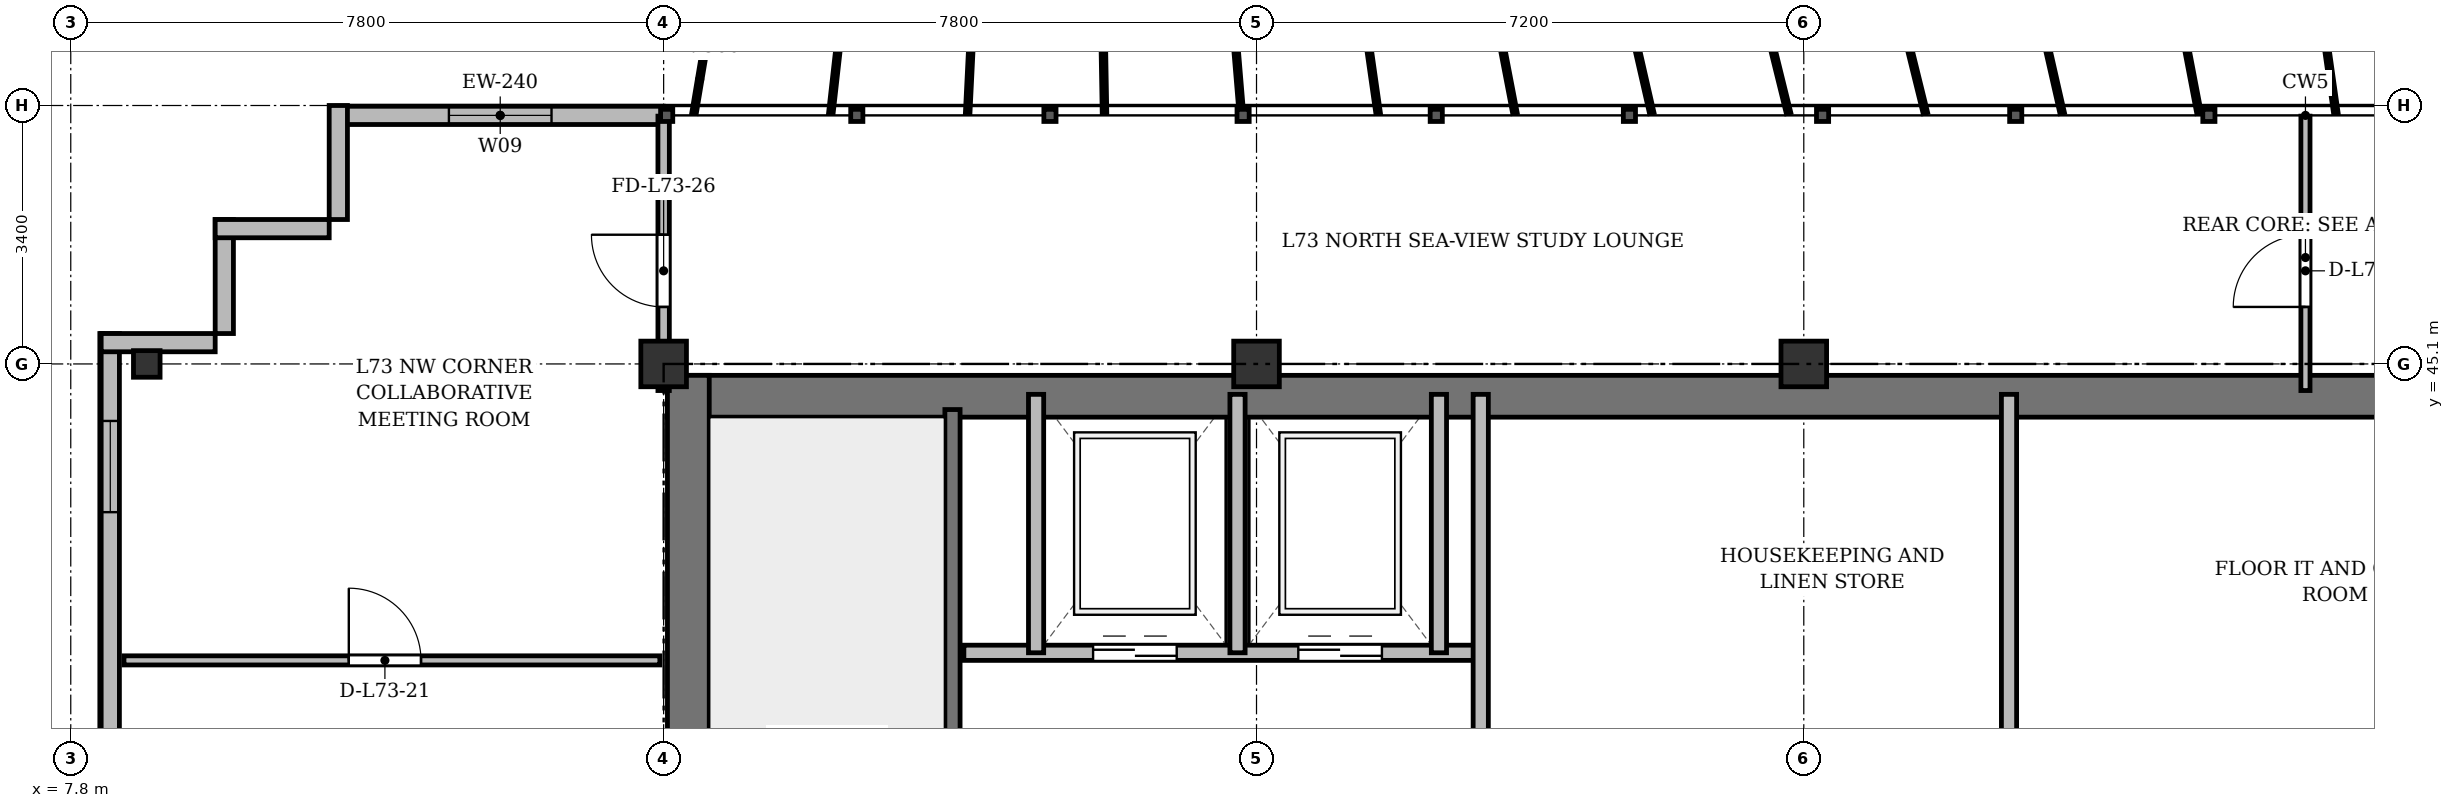
"""IFC4 building model, lengths in metres.
Left out: names, types, materials, properties, quantities, classifications, styles, units other than length and angle.
Written with IfcOpenShell. Run it as: python <this file> out.ifc"""

import sys

from ifc_helpers import new_model, si_unit, direction, frame, frame_2d, origin, origin_2d, place, context, subcontext, project, spatial, rectangle, i_section, extrude, source, transform, mapped, element, fill, save


model = new_model("IFC4")
c1 = context("Model", 3, precision=1e-05, world=origin(), true_north=direction((0.0, 1.0)))
c2 = subcontext(c1, "Body", "Model", "MODEL_VIEW")
j1 = project(units=[si_unit("LENGTHUNIT", "METRE"), si_unit("PLANEANGLEUNIT", "RADIAN")], contexts=[c1])
p1 = place(None, origin())
s1 = spatial("IfcSite", under=j1, at=p1, CompositionType="ELEMENT")
p2 = place(p1, origin())
s2 = spatial("IfcBuilding", under=s1, at=p2, CompositionType="ELEMENT")
p3 = place(p2, frame((0.0, 0.0, 281.1)))
s3 = spatial("IfcBuildingStorey", under=s2, at=p3, CompositionType="ELEMENT", Elevation=281.1)
m1 = source(origin(), c2, "Body", "SweptSolid", [
    extrude(i_section(OverallWidth=0.35, OverallDepth=0.35, WebThickness=0.018, FlangeThickness=0.028, at=origin_2d()), origin(), (0.0, 0.0, 1.0), 3.6),
])
p4 = place(p3, frame((8.8, 45.1, 0.0), z_axis=(0.0, 0.0, 1.0), x_axis=(1.0, 0.0, 0.0)))
e1 = element("IfcColumn", 1, at=p4, inside=s3, PredefinedType="COLUMN", context=c2, shape_type="MappedRepresentation", body=[
    mapped(m1, transform((0.0, 0.0, 0.0), x_axis=(1.0, 0.0, 0.0), y_axis=(0.0, 1.0, 0.0), z_axis=(0.0, 0.0, 1.0), scale=1.0)),
])
m2 = source(origin(), c2, "Body", "SweptSolid", [
    extrude(rectangle(XDim=0.6, YDim=0.6, at=origin_2d()), origin(), (0.0, 0.0, 1.0), 3.6),
])
for number, where, z_axis, x_axis in (
    (2, (15.6, 45.1, 0.0), (0.0, 0.0, 1.0), (1.0, 0.0, 0.0)),
    (3, (23.4, 45.1, 0.0), (0.0, 0.0, 1.0), (1.0, 0.0, 0.0)),
    (4, (30.6, 45.1, 0.0), (0.0, 0.0, 1.0), (1.0, 0.0, 0.0)),
):
    element("IfcColumn", number, at=place(p3, frame(where, z_axis=z_axis, x_axis=x_axis)), inside=s3, PredefinedType="COLUMN", context=c2, shape_type="MappedRepresentation", body=[
        mapped(m2, transform((0.0, 0.0, 0.0), x_axis=(1.0, 0.0, 0.0), y_axis=(0.0, 1.0, 0.0), z_axis=(0.0, 0.0, 1.0), scale=1.0)),
    ])
p5 = place(p3, frame((11.3, 48.37, 0.0), z_axis=(0.0, 0.0, 1.0), x_axis=(1.0, 0.0, 0.0)))
e5 = element("IfcWall", 5, at=p5, inside=s3, PredefinedType="SOLIDWALL", context=c2, shape_type="SweptSolid", body=[
    extrude(rectangle(XDim=4.3, YDim=0.24, at=frame_2d((2.15, 0.0))), origin(), (0.0, 0.0, 1.0), 3.37),
])
p6 = place(p5, frame((1.475, 0.0, 0.9)))
e6 = element("IfcOpeningElement", 6, at=p6, cuts=e5, PredefinedType="OPENING", context=c2, shape_type="SweptSolid", body=[
    extrude(rectangle(XDim=1.35, YDim=1.5, at=frame_2d((0.675, 0.75))), frame((0.0, 0.13, 0.0), z_axis=(0.0, -1.0, 0.0), x_axis=(1.0, 0.0, 0.0)), (0.0, 0.0, 1.0), 0.26),
])
p7 = place(p3, frame((8.32, 6.5, 0.0), z_axis=(0.0, 0.0, 1.0), x_axis=(0.0, 1.0, 0.0)))
e7 = element("IfcWall", 7, at=p7, inside=s3, PredefinedType="SOLIDWALL", context=c2, shape_type="SweptSolid", body=[
    extrude(rectangle(XDim=39.0, YDim=0.24, at=frame_2d((19.5, 0.0))), origin(), (0.0, 0.0, 1.0), 3.37),
])
p8 = place(p7, frame((1.45, 0.0, 0.92)))
e8 = element("IfcOpeningElement", 8, at=p8, cuts=e7, PredefinedType="OPENING", context=c2, shape_type="SweptSolid", body=[
    extrude(rectangle(XDim=1.2, YDim=1.65, at=frame_2d((0.6, 0.825))), frame((0.0, 0.13, 0.0), z_axis=(0.0, -1.0, 0.0), x_axis=(1.0, 0.0, 0.0)), (0.0, 0.0, 1.0), 0.26),
])
p9 = place(p7, frame((3.7, 0.0, 0.92)))
e9 = element("IfcOpeningElement", 9, at=p9, cuts=e7, PredefinedType="OPENING", context=c2, shape_type="SweptSolid", body=[
    extrude(rectangle(XDim=2.4, YDim=2.1, at=frame_2d((1.2, 1.05))), frame((0.0, 0.13, 0.0), z_axis=(0.0, -1.0, 0.0), x_axis=(1.0, 0.0, 0.0)), (0.0, 0.0, 1.0), 0.26),
])
p10 = place(p7, frame((15.1, 0.0, 0.92)))
e10 = element("IfcOpeningElement", 10, at=p10, cuts=e7, PredefinedType="OPENING", context=c2, shape_type="SweptSolid", body=[
    extrude(rectangle(XDim=2.4, YDim=2.1, at=frame_2d((1.2, 1.05))), frame((0.0, 0.13, 0.0), z_axis=(0.0, -1.0, 0.0), x_axis=(1.0, 0.0, 0.0)), (0.0, 0.0, 1.0), 0.26),
])
p11 = place(p7, frame((29.1, 0.0, 0.92)))
e11 = element("IfcOpeningElement", 11, at=p11, cuts=e7, PredefinedType="OPENING", context=c2, shape_type="SweptSolid", body=[
    extrude(rectangle(XDim=2.4, YDim=2.1, at=frame_2d((1.2, 1.05))), frame((0.0, 0.13, 0.0), z_axis=(0.0, -1.0, 0.0), x_axis=(1.0, 0.0, 0.0)), (0.0, 0.0, 1.0), 0.26),
])
p12 = place(p7, frame((36.65, 0.0, 0.92)))
e12 = element("IfcOpeningElement", 12, at=p12, cuts=e7, PredefinedType="OPENING", context=c2, shape_type="SweptSolid", body=[
    extrude(rectangle(XDim=1.2, YDim=1.65, at=frame_2d((0.6, 0.825))), frame((0.0, 0.13, 0.0), z_axis=(0.0, -1.0, 0.0), x_axis=(1.0, 0.0, 0.0)), (0.0, 0.0, 1.0), 0.26),
])
for number, where, z_axis, x_axis in (
    (13, (8.2, 45.38, 0.0), (0.0, 0.0, 1.0), (1.0, 0.0, 0.0)),
    (14, (9.82, 45.5, 0.0), (0.0, 0.0, 1.0), (0.0, 1.0, 0.0)),
    (15, (9.7, 46.88, 0.0), (0.0, 0.0, 1.0), (1.0, 0.0, 0.0)),
    (16, (11.32, 47.0, 0.0), (0.0, 0.0, 1.0), (0.0, 1.0, 0.0)),
):
    element("IfcWall", number, at=place(p3, frame(where, z_axis=z_axis, x_axis=x_axis)), inside=s3, PredefinedType="SOLIDWALL", context=c2, shape_type="SweptSolid", body=[
        extrude(rectangle(XDim=1.5, YDim=0.24, at=frame_2d((0.75, 0.0))), origin(), (0.0, 0.0, 1.0), 3.37),
    ])
p13 = place(p3, frame((15.65, 44.675, 0.0), z_axis=(0.0, 0.0, 1.0), x_axis=(1.0, 0.0, 0.0)))
e17 = element("IfcWall", 17, at=p13, inside=s3, PredefinedType="SHEAR", context=c2, shape_type="SweptSolid", body=[
    extrude(rectangle(XDim=43.1, YDim=0.55, at=frame_2d((21.55, 0.0))), origin(), (0.0, 0.0, 1.0), 3.37),
])
p14 = place(p3, frame((15.925, 33.4, 0.0), z_axis=(0.0, 0.0, 1.0), x_axis=(0.0, 1.0, 0.0)))
e18 = element("IfcWall", 18, at=p14, inside=s3, PredefinedType="SHEAR", context=c2, shape_type="SweptSolid", body=[
    extrude(rectangle(XDim=11.55, YDim=0.55, at=frame_2d((5.775, 0.0))), origin(), (0.0, 0.0, 1.0), 3.37),
])
p15 = place(p3, frame((19.4, 33.4, 0.0), z_axis=(0.0, 0.0, 1.0), x_axis=(0.0, 1.0, 0.0)))
e19 = element("IfcWall", 19, at=p15, inside=s3, PredefinedType="SHEAR", context=c2, shape_type="SweptSolid", body=[
    extrude(rectangle(XDim=11.1, YDim=0.2, at=frame_2d((5.55, 0.0))), origin(), (0.0, 0.0, 1.0), 3.37),
])
p16 = place(p15, frame((0.85, 0.0, 0.0)))
e20 = element("IfcOpeningElement", 20, at=p16, cuts=e19, PredefinedType="OPENING", context=c2, shape_type="SweptSolid", body=[
    extrude(rectangle(XDim=1.1, YDim=2.15, at=frame_2d((0.55, 1.075))), frame((0.0, 0.11, 0.0), z_axis=(0.0, -1.0, 0.0), x_axis=(1.0, 0.0, 0.0)), (0.0, 0.0, 1.0), 0.22),
])
p17 = place(p3, frame((19.55, 41.3, 0.0), z_axis=(0.0, 0.0, 1.0), x_axis=(1.0, 0.0, 0.0)))
e21 = element("IfcWall", 21, at=p17, inside=s3, PredefinedType="SOLIDWALL", context=c2, shape_type="SweptSolid", body=[
    extrude(rectangle(XDim=6.75, YDim=0.2, at=frame_2d((3.375, 0.0))), origin(), (0.0, 0.0, 1.0), 3.37),
])
p18 = place(p17, frame((1.7, 0.0, 0.0)))
e22 = element("IfcOpeningElement", 22, at=p18, cuts=e21, PredefinedType="OPENING", context=c2, shape_type="SweptSolid", body=[
    extrude(rectangle(XDim=1.1, YDim=2.15, at=frame_2d((0.55, 1.075))), frame((0.0, 0.11, 0.0), z_axis=(0.0, -1.0, 0.0), x_axis=(1.0, 0.0, 0.0)), (0.0, 0.0, 1.0), 0.22),
])
p19 = place(p17, frame((4.4, 0.0, 0.0)))
e23 = element("IfcOpeningElement", 23, at=p19, cuts=e21, PredefinedType="OPENING", context=c2, shape_type="SweptSolid", body=[
    extrude(rectangle(XDim=1.1, YDim=2.15, at=frame_2d((0.55, 1.075))), frame((0.0, 0.11, 0.0), z_axis=(0.0, -1.0, 0.0), x_axis=(1.0, 0.0, 0.0)), (0.0, 0.0, 1.0), 0.22),
])
for number, where, z_axis, x_axis in (
    (24, (20.5, 41.3, 0.0), (0.0, 0.0, 1.0), (0.0, 1.0, 0.0)),
    (25, (23.15, 41.3, 0.0), (0.0, 0.0, 1.0), (0.0, 1.0, 0.0)),
    (26, (25.8, 41.3, 0.0), (0.0, 0.0, 1.0), (0.0, 1.0, 0.0)),
):
    element("IfcWall", number, at=place(p3, frame(where, z_axis=z_axis, x_axis=x_axis)), inside=s3, PredefinedType="SOLIDWALL", context=c2, shape_type="SweptSolid", body=[
        extrude(rectangle(XDim=3.4, YDim=0.2, at=frame_2d((1.7, 0.0))), origin(), (0.0, 0.0, 1.0), 3.37),
    ])
for number, where, z_axis, x_axis in (
    (27, (26.35, 33.4, 0.0), (0.0, 0.0, 1.0), (0.0, 1.0, 0.0)),
    (28, (33.3, 33.4, 0.0), (0.0, 0.0, 1.0), (0.0, 1.0, 0.0)),
):
    element("IfcWall", number, at=place(p3, frame(where, z_axis=z_axis, x_axis=x_axis)), inside=s3, PredefinedType="SOLIDWALL", context=c2, shape_type="SweptSolid", body=[
        extrude(rectangle(XDim=11.3, YDim=0.2, at=frame_2d((5.65, 0.0))), origin(), (0.0, 0.0, 1.0), 2.92),
    ])
p20 = place(p3, frame((8.5, 41.2, 0.0), z_axis=(0.0, 0.0, 1.0), x_axis=(1.0, 0.0, 0.0)))
e29 = element("IfcWall", 29, at=p20, inside=s3, PredefinedType="PARTITIONING", context=c2, shape_type="SweptSolid", body=[
    extrude(rectangle(XDim=7.05, YDim=0.12, at=frame_2d((3.525, 0.0))), origin(), (0.0, 0.0, 1.0), 2.87),
])
p21 = place(p20, frame((2.958, 0.0, 0.0)))
e30 = element("IfcOpeningElement", 30, at=p21, cuts=e29, PredefinedType="OPENING", context=c2, shape_type="SweptSolid", body=[
    extrude(rectangle(XDim=0.95, YDim=2.15, at=frame_2d((0.475, 1.075))), frame((0.0, 0.07, 0.0), z_axis=(0.0, -1.0, 0.0), x_axis=(1.0, 0.0, 0.0)), (0.0, 0.0, 1.0), 0.14),
])
p22 = place(p3, frame((37.2, 44.75, 0.0), z_axis=(0.0, 0.0, 1.0), x_axis=(0.0, 1.0, 0.0)))
e31 = element("IfcWall", 31, at=p22, inside=s3, PredefinedType="PARTITIONING", context=c2, shape_type="SweptSolid", body=[
    extrude(rectangle(XDim=3.61, YDim=0.12, at=frame_2d((1.805, 0.0))), origin(), (0.0, 0.0, 1.0), 2.92),
])
p23 = place(p22, frame((1.1, 0.0, 0.0)))
e32 = element("IfcOpeningElement", 32, at=p23, cuts=e31, PredefinedType="OPENING", context=c2, shape_type="SweptSolid", body=[
    extrude(rectangle(XDim=0.95, YDim=2.15, at=frame_2d((0.475, 1.075))), frame((0.0, 0.07, 0.0), z_axis=(0.0, -1.0, 0.0), x_axis=(1.0, 0.0, 0.0)), (0.0, 0.0, 1.0), 0.14),
])
p24 = place(p3, frame((15.6, 44.75, 0.0), z_axis=(0.0, 0.0, 1.0), x_axis=(0.0, 1.0, 0.0)))
e33 = element("IfcWall", 33, at=p24, inside=s3, PredefinedType="PARTITIONING", context=c2, shape_type="SweptSolid", body=[
    extrude(rectangle(XDim=3.61, YDim=0.15, at=frame_2d((1.805, 0.0))), origin(), (0.0, 0.0, 1.0), 2.87),
])
p25 = place(p24, frame((1.1, 0.0, 0.0)))
e34 = element("IfcOpeningElement", 34, at=p25, cuts=e33, PredefinedType="OPENING", context=c2, shape_type="SweptSolid", body=[
    extrude(rectangle(XDim=0.95, YDim=2.15, at=frame_2d((0.475, 1.075))), frame((0.0, 0.085, 0.0), z_axis=(0.0, -1.0, 0.0), x_axis=(1.0, 0.0, 0.0)), (0.0, 0.0, 1.0), 0.17),
])
m3 = source(origin(), c2, "Body", "SweptSolid", [
    extrude(rectangle(XDim=1.35, YDim=1.5, at=frame_2d((0.675, 0.75))), frame((0.0, 0.03, 0.0), z_axis=(0.0, -1.0, 0.0), x_axis=(1.0, 0.0, 0.0)), (0.0, 0.0, 1.0), 0.06),
])
p26 = place(p6, origin())
e35 = element("IfcWindow", 35, at=p26, inside=s3, PartitioningType="SINGLE_PANEL", PredefinedType="WINDOW", context=c2, shape_type="MappedRepresentation", body=[
    mapped(m3, transform((0.0, 0.0, 0.0), x_axis=(1.0, 0.0, 0.0), y_axis=(0.0, 1.0, 0.0), z_axis=(0.0, 0.0, 1.0), scale=1.0)),
])
fill(e6, e35)
m4 = source(origin(), c2, "Body", "SweptSolid", [
    extrude(rectangle(XDim=1.2, YDim=1.65, at=frame_2d((0.6, 0.825))), frame((0.0, 0.03, 0.0), z_axis=(0.0, -1.0, 0.0), x_axis=(1.0, 0.0, 0.0)), (0.0, 0.0, 1.0), 0.06),
])
p27 = place(p12, origin())
e36 = element("IfcWindow", 36, at=p27, inside=s3, PartitioningType="SINGLE_PANEL", PredefinedType="WINDOW", context=c2, shape_type="MappedRepresentation", body=[
    mapped(m4, transform((0.0, 0.0, 0.0), x_axis=(1.0, 0.0, 0.0), y_axis=(0.0, 1.0, 0.0), z_axis=(0.0, 0.0, 1.0), scale=1.0)),
])
fill(e12, e36)
m5 = source(origin(), c2, "Body", "SweptSolid", [
    extrude(rectangle(XDim=1.1, YDim=2.15, at=frame_2d((0.55, 1.075))), frame((0.0, 0.025, 0.0), z_axis=(0.0, -1.0, 0.0), x_axis=(1.0, 0.0, 0.0)), (0.0, 0.0, 1.0), 0.05),
])
p28 = place(p18, origin())
e37 = element("IfcDoor", 37, at=p28, inside=s3, OperationType="DOUBLE_DOOR_SLIDING", PredefinedType="DOOR", context=c2, shape_type="MappedRepresentation", body=[
    mapped(m5, transform((0.0, 0.0, 0.0), x_axis=(1.0, 0.0, 0.0), y_axis=(0.0, 1.0, 0.0), z_axis=(0.0, 0.0, 1.0), scale=1.0)),
])
fill(e22, e37)
p29 = place(p19, origin())
e38 = element("IfcDoor", 38, at=p29, inside=s3, OperationType="DOUBLE_DOOR_SLIDING", PredefinedType="DOOR", context=c2, shape_type="MappedRepresentation", body=[
    mapped(m5, transform((0.0, 0.0, 0.0), x_axis=(1.0, 0.0, 0.0), y_axis=(0.0, 1.0, 0.0), z_axis=(0.0, 0.0, 1.0), scale=1.0)),
])
fill(e23, e38)
m6 = source(origin(), c2, "Body", "SweptSolid", [
    extrude(rectangle(XDim=0.95, YDim=2.15, at=frame_2d((0.475, 1.075))), frame((0.0, 0.025, 0.0), z_axis=(0.0, -1.0, 0.0), x_axis=(1.0, 0.0, 0.0)), (0.0, 0.0, 1.0), 0.05),
])
p30 = place(p21, origin())
e39 = element("IfcDoor", 39, at=p30, inside=s3, OperationType="SINGLE_SWING_LEFT", PredefinedType="DOOR", context=c2, shape_type="MappedRepresentation", body=[
    mapped(m6, transform((0.0, 0.0, 0.0), x_axis=(1.0, 0.0, 0.0), y_axis=(0.0, 1.0, 0.0), z_axis=(0.0, 0.0, 1.0), scale=1.0)),
])
fill(e30, e39)
p31 = place(p23, origin())
e40 = element("IfcDoor", 40, at=p31, inside=s3, OperationType="SINGLE_SWING_LEFT", PredefinedType="DOOR", context=c2, shape_type="MappedRepresentation", body=[
    mapped(m6, transform((0.0, 0.0, 0.0), x_axis=(1.0, 0.0, 0.0), y_axis=(0.0, 1.0, 0.0), z_axis=(0.0, 0.0, 1.0), scale=1.0)),
])
fill(e32, e40)
p32 = place(p25, origin())
e41 = element("IfcDoor", 41, at=p32, inside=s3, OperationType="SINGLE_SWING_RIGHT", PredefinedType="DOOR", context=c2, shape_type="MappedRepresentation", body=[
    mapped(m6, transform((0.0, 0.0, 0.0), x_axis=(1.0, 0.0, 0.0), y_axis=(0.0, 1.0, 0.0), z_axis=(0.0, 0.0, 1.0), scale=1.0)),
])
fill(e34, e41)
save(model, sys.argv[1])
